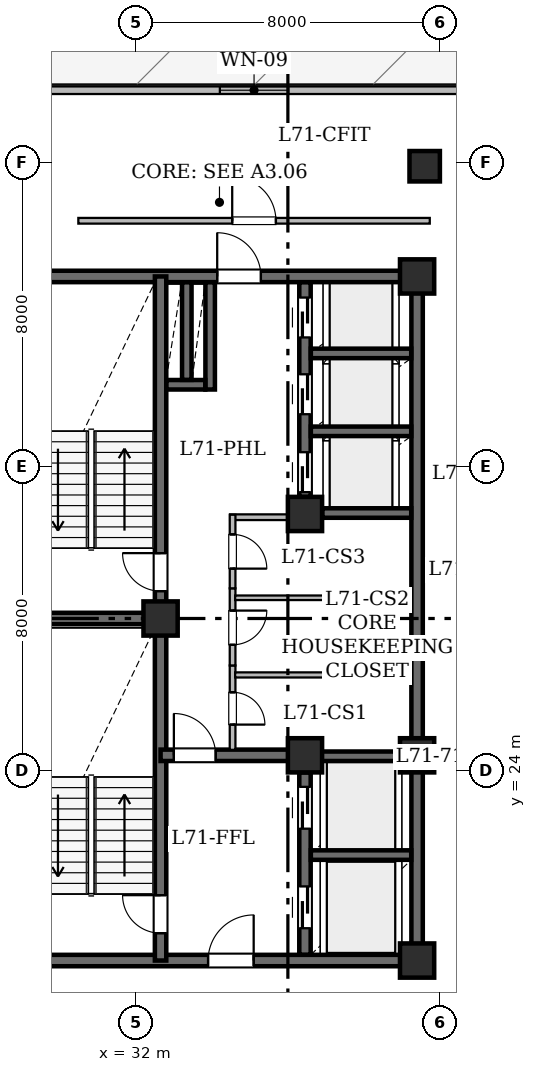
"""IFC4 building model, lengths in metres.
Left out: names, types, materials, properties, quantities, classifications, styles, units other than length and angle.
Written with IfcOpenShell. Run it as: python <this file> out.ifc"""

import sys

from ifc_helpers import new_model, si_unit, direction, frame, frame_2d, origin, origin_2d, place, context, subcontext, project, spatial, rectangle, hollow_rectangle, extrude, element, fill, save


model = new_model("IFC4")
c1 = context("Model", 3, precision=1e-05, world=origin(), true_north=direction((0.0, 1.0)))
c2 = subcontext(c1, "Body", "Model", "MODEL_VIEW")
j1 = project(units=[si_unit("LENGTHUNIT", "METRE"), si_unit("PLANEANGLEUNIT", "RADIAN")], contexts=[c1])
p1 = place(None, origin())
s1 = spatial("IfcSite", under=j1, at=p1, CompositionType="ELEMENT")
p2 = place(p1, origin())
s2 = spatial("IfcBuilding", under=s1, at=p2, CompositionType="ELEMENT")
p3 = place(p2, frame((0.0, 0.0, 277.85)))
s3 = spatial("IfcBuildingStorey", under=s2, at=p3, CompositionType="ELEMENT", Elevation=277.85)
for number, where, z_axis, x_axis in (
    (1, (32.65, 28.0, 0.0), (0.0, 0.0, 1.0), (1.0, 0.0, 0.0)),
    (2, (39.4, 19.0, 0.0), (0.0, 0.0, 1.0), (1.0, 0.0, 0.0)),
    (3, (36.45, 24.4, 0.0), (0.0, 0.0, 1.0), (1.0, 0.0, 0.0)),
    (4, (39.4, 24.4, 0.0), (0.0, 0.0, 1.0), (1.0, 0.0, 0.0)),
    (5, (36.45, 30.75, 0.0), (0.0, 0.0, 1.0), (1.0, 0.0, 0.0)),
    (6, (39.4, 37.0, 0.0), (0.0, 0.0, 1.0), (1.0, 0.0, 0.0)),
):
    element("IfcColumn", number, at=place(p3, frame(where, z_axis=z_axis, x_axis=x_axis)), inside=s3, PredefinedType="COLUMN", context=c2, shape_type="SweptSolid", body=[
        extrude(hollow_rectangle(XDim=0.9, YDim=0.9, WallThickness=0.045, at=origin_2d()), origin(), (0.0, 0.0, 1.0), 4.2),
    ])
p4 = place(p3, frame((39.6, 39.9, 0.025), z_axis=(0.0, 0.0, 1.0), x_axis=(1.0, 0.0, 0.0)))
e7 = element("IfcColumn", 7, at=p4, inside=s3, PredefinedType="COLUMN", context=c2, shape_type="SweptSolid", body=[
    extrude(hollow_rectangle(XDim=0.8, YDim=0.8, WallThickness=0.04, at=origin_2d()), origin(), (0.0, 0.0, 1.0), 4.175),
])
p5 = place(p3, frame((27.102, 41.9, 0.0), z_axis=(0.0, 0.0, 1.0), x_axis=(1.0, 0.0, 0.0)))
e8 = element("IfcWall", 8, at=p5, inside=s3, PredefinedType="STANDARD", context=c2, shape_type="SweptSolid", body=[
    extrude(rectangle(XDim=35.857, YDim=0.2, at=frame_2d((17.928, 0.0))), origin(), (0.0, 0.0, 1.0), 3.95),
])
p6 = place(p5, frame((20.417, 0.0, 0.0)))
e9 = element("IfcOpeningElement", 9, at=p6, cuts=e8, PredefinedType="OPENING", context=c2, shape_type="SweptSolid", body=[
    extrude(rectangle(XDim=1.0, YDim=2.15, at=frame_2d((0.5, 1.075))), frame((0.0, 0.11, 0.0), z_axis=(0.0, -1.0, 0.0), x_axis=(1.0, 0.0, 0.0)), (0.0, 0.0, 1.0), 0.22),
])
p7 = place(p5, frame((7.108, 0.0, 0.85)))
e10 = element("IfcOpeningElement", 10, at=p7, cuts=e8, PredefinedType="OPENING", context=c2, shape_type="SweptSolid", body=[
    extrude(rectangle(XDim=1.8, YDim=0.92, at=frame_2d((0.9, 0.46))), frame((0.0, 0.11, 0.0), z_axis=(0.0, -1.0, 0.0), x_axis=(1.0, 0.0, 0.0)), (0.0, 0.0, 1.0), 0.22),
])
p8 = place(p5, frame((17.233, 0.0, 0.78)))
e11 = element("IfcOpeningElement", 11, at=p8, cuts=e8, PredefinedType="OPENING", context=c2, shape_type="SweptSolid", body=[
    extrude(rectangle(XDim=1.2, YDim=1.5, at=frame_2d((0.6, 0.75))), frame((0.0, 0.11, 0.0), z_axis=(0.0, -1.0, 0.0), x_axis=(1.0, 0.0, 0.0)), (0.0, 0.0, 1.0), 0.22),
])
p9 = place(p5, frame((26.073, 0.0, 0.85)))
e12 = element("IfcOpeningElement", 12, at=p9, cuts=e8, PredefinedType="OPENING", context=c2, shape_type="SweptSolid", body=[
    extrude(rectangle(XDim=1.8, YDim=0.92, at=frame_2d((0.9, 0.46))), frame((0.0, 0.11, 0.0), z_axis=(0.0, -1.0, 0.0), x_axis=(1.0, 0.0, 0.0)), (0.0, 0.0, 1.0), 0.22),
])
p10 = place(p3, frame((29.0, 19.0, 0.0), z_axis=(0.0, 0.0, 1.0), x_axis=(1.0, 0.0, 0.0)))
e13 = element("IfcWall", 13, at=p10, inside=s3, PredefinedType="SHEAR", context=c2, shape_type="SweptSolid", body=[
    extrude(rectangle(XDim=10.4, YDim=0.3, at=frame_2d((5.2, 0.0))), origin(), (0.0, 0.0, 1.0), 3.95),
])
p11 = place(p10, frame((4.9, 0.0, 0.0)))
e14 = element("IfcOpeningElement", 14, at=p11, cuts=e13, PredefinedType="OPENING", context=c2, shape_type="SweptSolid", body=[
    extrude(rectangle(XDim=1.2, YDim=2.15, at=frame_2d((0.6, 1.075))), frame((0.0, 0.16, 0.0), z_axis=(0.0, -1.0, 0.0), x_axis=(1.0, 0.0, 0.0)), (0.0, 0.0, 1.0), 0.32),
])
p12 = place(p3, frame((29.0, 37.0, 0.0), z_axis=(0.0, 0.0, 1.0), x_axis=(1.0, 0.0, 0.0)))
e15 = element("IfcWall", 15, at=p12, inside=s3, PredefinedType="SHEAR", context=c2, shape_type="SweptSolid", body=[
    extrude(rectangle(XDim=10.4, YDim=0.3, at=frame_2d((5.2, 0.0))), origin(), (0.0, 0.0, 1.0), 3.95),
])
p13 = place(p12, frame((5.14, 0.0, 0.0)))
e16 = element("IfcOpeningElement", 16, at=p13, cuts=e15, PredefinedType="OPENING", context=c2, shape_type="SweptSolid", body=[
    extrude(rectangle(XDim=1.15, YDim=2.2, at=frame_2d((0.575, 1.1))), frame((0.0, 0.16, 0.0), z_axis=(0.0, -1.0, 0.0), x_axis=(1.0, 0.0, 0.0)), (0.0, 0.0, 1.0), 0.32),
])
p14 = place(p3, frame((39.4, 19.0, 0.0), z_axis=(0.0, 0.0, 1.0), x_axis=(0.0, 1.0, 0.0)))
e17 = element("IfcWall", 17, at=p14, inside=s3, PredefinedType="SHEAR", context=c2, shape_type="SweptSolid", body=[
    extrude(rectangle(XDim=5.4, YDim=0.3, at=frame_2d((2.7, 0.0))), origin(), (0.0, 0.0, 1.0), 3.95),
])
p15 = place(p3, frame((39.4, 24.4, 0.0), z_axis=(0.0, 0.0, 1.0), x_axis=(0.0, 1.0, 0.0)))
e18 = element("IfcWall", 18, at=p15, inside=s3, PredefinedType="SHEAR", context=c2, shape_type="SweptSolid", body=[
    extrude(rectangle(XDim=12.6, YDim=0.3, at=frame_2d((6.3, 0.0))), origin(), (0.0, 0.0, 1.0), 3.95),
])
p16 = place(p3, frame((32.65, 19.0, 0.0), z_axis=(0.0, 0.0, 1.0), x_axis=(0.0, 1.0, 0.0)))
e19 = element("IfcWall", 19, at=p16, inside=s3, PredefinedType="SHEAR", context=c2, shape_type="SweptSolid", body=[
    extrude(rectangle(XDim=9.0, YDim=0.3, at=frame_2d((4.5, 0.0))), origin(), (0.0, 0.0, 1.0), 3.95),
])
p17 = place(p16, frame((0.72, 0.0, 0.0)))
e20 = element("IfcOpeningElement", 20, at=p17, cuts=e19, PredefinedType="OPENING", context=c2, shape_type="SweptSolid", body=[
    extrude(rectangle(XDim=1.0, YDim=2.15, at=frame_2d((0.5, 1.075))), frame((0.0, 0.16, 0.0), z_axis=(0.0, -1.0, 0.0), x_axis=(1.0, 0.0, 0.0)), (0.0, 0.0, 1.0), 0.32),
])
p18 = place(p3, frame((32.65, 28.0, 0.0), z_axis=(0.0, 0.0, 1.0), x_axis=(0.0, 1.0, 0.0)))
e21 = element("IfcWall", 21, at=p18, inside=s3, PredefinedType="SHEAR", context=c2, shape_type="SweptSolid", body=[
    extrude(rectangle(XDim=9.0, YDim=0.3, at=frame_2d((4.5, 0.0))), origin(), (0.0, 0.0, 1.0), 3.95),
])
p19 = place(p18, frame((0.72, 0.0, 0.0)))
e22 = element("IfcOpeningElement", 22, at=p19, cuts=e21, PredefinedType="OPENING", context=c2, shape_type="SweptSolid", body=[
    extrude(rectangle(XDim=1.0, YDim=2.15, at=frame_2d((0.5, 1.075))), frame((0.0, 0.16, 0.0), z_axis=(0.0, -1.0, 0.0), x_axis=(1.0, 0.0, 0.0)), (0.0, 0.0, 1.0), 0.32),
])
p20 = place(p3, frame((29.0, 28.0, 0.0), z_axis=(0.0, 0.0, 1.0), x_axis=(1.0, 0.0, 0.0)))
e23 = element("IfcWall", 23, at=p20, inside=s3, PredefinedType="SHEAR", context=c2, shape_type="SweptSolid", body=[
    extrude(rectangle(XDim=3.65, YDim=0.3, at=frame_2d((1.825, 0.0))), origin(), (0.0, 0.0, 1.0), 3.95),
])
p21 = place(p3, frame((32.65, 24.4, 0.0), z_axis=(0.0, 0.0, 1.0), x_axis=(1.0, 0.0, 0.0)))
e24 = element("IfcWall", 24, at=p21, inside=s3, PredefinedType="SHEAR", context=c2, shape_type="SweptSolid", body=[
    extrude(rectangle(XDim=3.8, YDim=0.3, at=frame_2d((1.9, 0.0))), origin(), (0.0, 0.0, 1.0), 3.95),
])
p22 = place(p21, frame((0.35, 0.0, 0.0)))
e25 = element("IfcOpeningElement", 25, at=p22, cuts=e24, PredefinedType="OPENING", context=c2, shape_type="SweptSolid", body=[
    extrude(rectangle(XDim=1.1, YDim=2.15, at=frame_2d((0.55, 1.075))), frame((0.0, 0.16, 0.0), z_axis=(0.0, -1.0, 0.0), x_axis=(1.0, 0.0, 0.0)), (0.0, 0.0, 1.0), 0.32),
])
p23 = place(p3, frame((36.45, 19.154, 0.0), z_axis=(0.0, 0.0, 1.0), x_axis=(0.0, 1.0, 0.0)))
e26 = element("IfcWall", 26, at=p23, inside=s3, PredefinedType="SHEAR", context=c2, shape_type="SweptSolid", body=[
    extrude(rectangle(XDim=4.796, YDim=0.3, at=frame_2d((2.398, 0.0))), origin(), (0.0, 0.0, 1.0), 3.95),
])
p24 = place(p23, frame((0.696, 0.0, 0.0)))
e27 = element("IfcOpeningElement", 27, at=p24, cuts=e26, PredefinedType="OPENING", context=c2, shape_type="SweptSolid", body=[
    extrude(rectangle(XDim=1.1, YDim=2.15, at=frame_2d((0.55, 1.075))), frame((0.0, 0.16, 0.0), z_axis=(0.0, -1.0, 0.0), x_axis=(1.0, 0.0, 0.0)), (0.0, 0.0, 1.0), 0.32),
])
p25 = place(p23, frame((3.316, 0.0, 0.0)))
e28 = element("IfcOpeningElement", 28, at=p25, cuts=e26, PredefinedType="OPENING", context=c2, shape_type="SweptSolid", body=[
    extrude(rectangle(XDim=1.1, YDim=2.15, at=frame_2d((0.55, 1.075))), frame((0.0, 0.16, 0.0), z_axis=(0.0, -1.0, 0.0), x_axis=(1.0, 0.0, 0.0)), (0.0, 0.0, 1.0), 0.32),
])
p26 = place(p3, frame((36.45, 31.2, 0.0), z_axis=(0.0, 0.0, 1.0), x_axis=(0.0, 1.0, 0.0)))
e29 = element("IfcWall", 29, at=p26, inside=s3, PredefinedType="SHEAR", context=c2, shape_type="SweptSolid", body=[
    extrude(rectangle(XDim=5.646, YDim=0.3, at=frame_2d((2.823, 0.0))), origin(), (0.0, 0.0, 1.0), 3.95),
])
p27 = place(p26, frame((0.125, 0.0, 0.0)))
e30 = element("IfcOpeningElement", 30, at=p27, cuts=e29, PredefinedType="OPENING", context=c2, shape_type="SweptSolid", body=[
    extrude(rectangle(XDim=1.05, YDim=2.15, at=frame_2d((0.525, 1.075))), frame((0.0, 0.16, 0.0), z_axis=(0.0, -1.0, 0.0), x_axis=(1.0, 0.0, 0.0)), (0.0, 0.0, 1.0), 0.32),
])
p28 = place(p26, frame((2.175, 0.0, 0.0)))
e31 = element("IfcOpeningElement", 31, at=p28, cuts=e29, PredefinedType="OPENING", context=c2, shape_type="SweptSolid", body=[
    extrude(rectangle(XDim=1.05, YDim=2.15, at=frame_2d((0.525, 1.075))), frame((0.0, 0.16, 0.0), z_axis=(0.0, -1.0, 0.0), x_axis=(1.0, 0.0, 0.0)), (0.0, 0.0, 1.0), 0.32),
])
p29 = place(p26, frame((4.195, 0.0, 0.0)))
e32 = element("IfcOpeningElement", 32, at=p29, cuts=e29, PredefinedType="OPENING", context=c2, shape_type="SweptSolid", body=[
    extrude(rectangle(XDim=1.05, YDim=2.15, at=frame_2d((0.525, 1.075))), frame((0.0, 0.16, 0.0), z_axis=(0.0, -1.0, 0.0), x_axis=(1.0, 0.0, 0.0)), (0.0, 0.0, 1.0), 0.32),
])
for number, where, z_axis, x_axis in (
    (33, (36.604, 21.775, 0.0), (0.0, 0.0, 1.0), (1.0, 0.0, 0.0)),
    (34, (36.604, 24.375, 0.0), (0.0, 0.0, 1.0), (1.0, 0.0, 0.0)),
):
    element("IfcWall", number, at=place(p3, frame(where, z_axis=z_axis, x_axis=x_axis)), inside=s3, PredefinedType="SHEAR", context=c2, shape_type="SweptSolid", body=[
        extrude(rectangle(XDim=2.642, YDim=0.25, at=frame_2d((1.321, 0.0))), origin(), (0.0, 0.0, 1.0), 3.95),
    ])
p30 = place(p3, frame((36.904, 30.775, 0.0), z_axis=(0.0, 0.0, 1.0), x_axis=(1.0, 0.0, 0.0)))
e35 = element("IfcWall", 35, at=p30, inside=s3, PredefinedType="SHEAR", context=c2, shape_type="SweptSolid", body=[
    extrude(rectangle(XDim=2.342, YDim=0.25, at=frame_2d((1.171, 0.0))), origin(), (0.0, 0.0, 1.0), 3.95),
])
for number, where, z_axis, x_axis in (
    (36, (36.604, 32.925, 0.0), (0.0, 0.0, 1.0), (1.0, 0.0, 0.0)),
    (37, (36.604, 34.975, 0.0), (0.0, 0.0, 1.0), (1.0, 0.0, 0.0)),
):
    element("IfcWall", number, at=place(p3, frame(where, z_axis=z_axis, x_axis=x_axis)), inside=s3, PredefinedType="SHEAR", context=c2, shape_type="SweptSolid", body=[
        extrude(rectangle(XDim=2.642, YDim=0.25, at=frame_2d((1.321, 0.0))), origin(), (0.0, 0.0, 1.0), 3.95),
    ])
p31 = place(p3, frame((33.955, 34.025, 0.0), z_axis=(0.0, 0.0, 1.0), x_axis=(0.0, 1.0, 0.0)))
e38 = element("IfcWall", 38, at=p31, inside=s3, PredefinedType="SHEAR", context=c2, shape_type="SweptSolid", body=[
    extrude(rectangle(XDim=2.821, YDim=0.25, at=frame_2d((1.411, 0.0))), origin(), (0.0, 0.0, 1.0), 3.95),
])
p32 = place(p3, frame((32.804, 34.15, 0.0), z_axis=(0.0, 0.0, 1.0), x_axis=(1.0, 0.0, 0.0)))
e39 = element("IfcWall", 39, at=p32, inside=s3, PredefinedType="SHEAR", context=c2, shape_type="SweptSolid", body=[
    extrude(rectangle(XDim=1.022, YDim=0.25, at=frame_2d((0.511, 0.0))), origin(), (0.0, 0.0, 1.0), 3.95),
])
p33 = place(p3, frame((33.34, 34.279, 0.0), z_axis=(0.0, 0.0, 1.0), x_axis=(0.0, 1.0, 0.0)))
e40 = element("IfcWall", 40, at=p33, inside=s3, PredefinedType="SHEAR", context=c2, shape_type="SweptSolid", body=[
    extrude(rectangle(XDim=2.567, YDim=0.25, at=frame_2d((1.283, 0.0))), origin(), (0.0, 0.0, 1.0), 3.95),
])
p34 = place(p3, frame((34.545, 26.764, 0.0), z_axis=(0.0, 0.0, 1.0), x_axis=(0.0, -1.0, 0.0)))
e41 = element("IfcWall", 41, at=p34, inside=s3, PredefinedType="STANDARD", context=c2, shape_type="SweptSolid", body=[
    extrude(rectangle(XDim=2.22, YDim=0.15, at=frame_2d((1.11, 0.0))), origin(), (0.0, 0.0, 1.0), 3.95),
])
p35 = place(p34, frame((0.706, 0.0, 0.0)))
e42 = element("IfcOpeningElement", 42, at=p35, cuts=e41, PredefinedType="OPENING", context=c2, shape_type="SweptSolid", body=[
    extrude(rectangle(XDim=0.85, YDim=2.1, at=frame_2d((0.425, 1.05))), frame((0.0, 0.085, 0.0), z_axis=(0.0, -1.0, 0.0), x_axis=(1.0, 0.0, 0.0)), (0.0, 0.0, 1.0), 0.17),
])
p36 = place(p3, frame((34.545, 28.794, 0.0), z_axis=(0.0, 0.0, 1.0), x_axis=(0.0, -1.0, 0.0)))
e43 = element("IfcWall", 43, at=p36, inside=s3, PredefinedType="STANDARD", context=c2, shape_type="SweptSolid", body=[
    extrude(rectangle(XDim=2.03, YDim=0.15, at=frame_2d((1.015, 0.0))), origin(), (0.0, 0.0, 1.0), 3.95),
])
p37 = place(p36, frame((0.586, 0.0, 0.0)))
e44 = element("IfcOpeningElement", 44, at=p37, cuts=e43, PredefinedType="OPENING", context=c2, shape_type="SweptSolid", body=[
    extrude(rectangle(XDim=0.9, YDim=2.1, at=frame_2d((0.45, 1.05))), frame((0.0, 0.085, 0.0), z_axis=(0.0, -1.0, 0.0), x_axis=(1.0, 0.0, 0.0)), (0.0, 0.0, 1.0), 0.17),
])
p38 = place(p3, frame((36.3, 30.665, 0.0), z_axis=(0.0, 0.0, 1.0), x_axis=(-1.0, 0.0, 0.0)))
e45 = element("IfcWall", 45, at=p38, inside=s3, PredefinedType="STANDARD", context=c2, shape_type="SweptSolid", body=[
    extrude(rectangle(XDim=1.82, YDim=0.15, at=frame_2d((0.91, 0.0))), origin(), (0.0, 0.0, 1.0), 3.95),
])
p39 = place(p3, frame((34.545, 30.73, 0.0), z_axis=(0.0, 0.0, 1.0), x_axis=(0.0, -1.0, 0.0)))
e46 = element("IfcWall", 46, at=p39, inside=s3, PredefinedType="STANDARD", context=c2, shape_type="SweptSolid", body=[
    extrude(rectangle(XDim=1.936, YDim=0.15, at=frame_2d((0.968, 0.0))), origin(), (0.0, 0.0, 1.0), 3.95),
])
p40 = place(p39, frame((0.518, 0.0, 0.0)))
e47 = element("IfcOpeningElement", 47, at=p40, cuts=e46, PredefinedType="OPENING", context=c2, shape_type="SweptSolid", body=[
    extrude(rectangle(XDim=0.9, YDim=2.1, at=frame_2d((0.45, 1.05))), frame((0.0, 0.085, 0.0), z_axis=(0.0, -1.0, 0.0), x_axis=(1.0, 0.0, 0.0)), (0.0, 0.0, 1.0), 0.17),
])
p41 = place(p3, frame((34.612, 26.515, 0.0), z_axis=(0.0, 0.0, 1.0), x_axis=(1.0, 0.0, 0.0)))
e48 = element("IfcWall", 48, at=p41, inside=s3, PredefinedType="PARTITIONING", context=c2, shape_type="SweptSolid", body=[
    extrude(rectangle(XDim=4.644, YDim=0.135, at=frame_2d((2.322, 0.0))), origin(), (0.0, 0.0, 1.0), 3.95),
])
p42 = place(p3, frame((34.612, 28.545, 0.0), z_axis=(0.0, 0.0, 1.0), x_axis=(1.0, 0.0, 0.0)))
e49 = element("IfcWall", 49, at=p42, inside=s3, PredefinedType="PARTITIONING", context=c2, shape_type="SweptSolid", body=[
    extrude(rectangle(XDim=4.644, YDim=0.12, at=frame_2d((2.322, 0.0))), origin(), (0.0, 0.0, 1.0), 3.95),
])
p43 = place(p3, frame((30.486, 38.465, 0.0), z_axis=(0.0, 0.0, 1.0), x_axis=(1.0, 0.0, 0.0)))
e50 = element("IfcWall", 50, at=p43, inside=s3, PredefinedType="STANDARD", context=c2, shape_type="SweptSolid", body=[
    extrude(rectangle(XDim=9.248, YDim=0.15, at=frame_2d((4.624, 0.0))), origin(), (0.0, 0.0, 1.0), 3.245),
])
p44 = place(p43, frame((4.049, 0.0, 0.0)))
e51 = element("IfcOpeningElement", 51, at=p44, cuts=e50, PredefinedType="OPENING", context=c2, shape_type="SweptSolid", body=[
    extrude(rectangle(XDim=1.15, YDim=2.2, at=frame_2d((0.575, 1.1))), frame((0.0, 0.085, 0.0), z_axis=(0.0, -1.0, 0.0), x_axis=(1.0, 0.0, 0.0)), (0.0, 0.0, 1.0), 0.17),
])
p45 = place(p7, origin())
e52 = element("IfcWindow", 52, at=p45, inside=s3, PartitioningType="SINGLE_PANEL", PredefinedType="WINDOW", context=c2, shape_type="SweptSolid", body=[
    extrude(rectangle(XDim=1.8, YDim=0.92, at=frame_2d((0.9, 0.46))), frame((0.0, 0.03, 0.0), z_axis=(0.0, -1.0, 0.0), x_axis=(1.0, 0.0, 0.0)), (0.0, 0.0, 1.0), 0.06),
])
fill(e10, e52)
p46 = place(p17, origin())
e53 = element("IfcDoor", 53, at=p46, inside=s3, OperationType="SINGLE_SWING_RIGHT", PredefinedType="DOOR", context=c2, shape_type="SweptSolid", body=[
    extrude(rectangle(XDim=1.0, YDim=2.15, at=frame_2d((0.5, 1.075))), frame((0.0, 0.025, 0.0), z_axis=(0.0, -1.0, 0.0), x_axis=(1.0, 0.0, 0.0)), (0.0, 0.0, 1.0), 0.05),
])
fill(e20, e53)
p47 = place(p19, origin())
e54 = element("IfcDoor", 54, at=p47, inside=s3, OperationType="SINGLE_SWING_RIGHT", PredefinedType="DOOR", context=c2, shape_type="SweptSolid", body=[
    extrude(rectangle(XDim=1.0, YDim=2.15, at=frame_2d((0.5, 1.075))), frame((0.0, 0.025, 0.0), z_axis=(0.0, -1.0, 0.0), x_axis=(1.0, 0.0, 0.0)), (0.0, 0.0, 1.0), 0.05),
])
fill(e22, e54)
p48 = place(p22, origin())
e55 = element("IfcDoor", 55, at=p48, inside=s3, OperationType="SINGLE_SWING_LEFT", PredefinedType="DOOR", context=c2, shape_type="SweptSolid", body=[
    extrude(rectangle(XDim=1.1, YDim=2.15, at=frame_2d((0.55, 1.075))), frame((0.0, 0.025, 0.0), z_axis=(0.0, -1.0, 0.0), x_axis=(1.0, 0.0, 0.0)), (0.0, 0.0, 1.0), 0.05),
])
fill(e25, e55)
p49 = place(p11, origin())
e56 = element("IfcDoor", 56, at=p49, inside=s3, OperationType="SINGLE_SWING_RIGHT", PredefinedType="DOOR", context=c2, shape_type="SweptSolid", body=[
    extrude(rectangle(XDim=1.2, YDim=2.15, at=frame_2d((0.6, 1.075))), frame((0.0, 0.025, 0.0), z_axis=(0.0, -1.0, 0.0), x_axis=(1.0, 0.0, 0.0)), (0.0, 0.0, 1.0), 0.05),
])
fill(e14, e56)
p50 = place(p13, origin())
e57 = element("IfcDoor", 57, at=p50, inside=s3, OperationType="SINGLE_SWING_LEFT", PredefinedType="DOOR", context=c2, shape_type="SweptSolid", body=[
    extrude(rectangle(XDim=1.15, YDim=2.2, at=frame_2d((0.575, 1.1))), frame((0.0, 0.025, 0.0), z_axis=(0.0, -1.0, 0.0), x_axis=(1.0, 0.0, 0.0)), (0.0, 0.0, 1.0), 0.05),
])
fill(e16, e57)
p51 = place(p24, origin())
e58 = element("IfcDoor", 58, at=p51, inside=s3, OperationType="SLIDING_TO_LEFT", PredefinedType="DOOR", context=c2, shape_type="SweptSolid", body=[
    extrude(rectangle(XDim=1.1, YDim=2.15, at=frame_2d((0.55, 1.075))), frame((0.0, 0.025, 0.0), z_axis=(0.0, -1.0, 0.0), x_axis=(1.0, 0.0, 0.0)), (0.0, 0.0, 1.0), 0.05),
])
fill(e27, e58)
p52 = place(p25, origin())
e59 = element("IfcDoor", 59, at=p52, inside=s3, OperationType="SLIDING_TO_LEFT", PredefinedType="DOOR", context=c2, shape_type="SweptSolid", body=[
    extrude(rectangle(XDim=1.1, YDim=2.15, at=frame_2d((0.55, 1.075))), frame((0.0, 0.025, 0.0), z_axis=(0.0, -1.0, 0.0), x_axis=(1.0, 0.0, 0.0)), (0.0, 0.0, 1.0), 0.05),
])
fill(e28, e59)
p53 = place(p27, origin())
e60 = element("IfcDoor", 60, at=p53, inside=s3, OperationType="SLIDING_TO_LEFT", PredefinedType="DOOR", context=c2, shape_type="SweptSolid", body=[
    extrude(rectangle(XDim=1.05, YDim=2.15, at=frame_2d((0.525, 1.075))), frame((0.0, 0.025, 0.0), z_axis=(0.0, -1.0, 0.0), x_axis=(1.0, 0.0, 0.0)), (0.0, 0.0, 1.0), 0.05),
])
fill(e30, e60)
p54 = place(p28, origin())
e61 = element("IfcDoor", 61, at=p54, inside=s3, OperationType="SLIDING_TO_LEFT", PredefinedType="DOOR", context=c2, shape_type="SweptSolid", body=[
    extrude(rectangle(XDim=1.05, YDim=2.15, at=frame_2d((0.525, 1.075))), frame((0.0, 0.025, 0.0), z_axis=(0.0, -1.0, 0.0), x_axis=(1.0, 0.0, 0.0)), (0.0, 0.0, 1.0), 0.05),
])
fill(e31, e61)
p55 = place(p29, origin())
e62 = element("IfcDoor", 62, at=p55, inside=s3, OperationType="SLIDING_TO_LEFT", PredefinedType="DOOR", context=c2, shape_type="SweptSolid", body=[
    extrude(rectangle(XDim=1.05, YDim=2.15, at=frame_2d((0.525, 1.075))), frame((0.0, 0.025, 0.0), z_axis=(0.0, -1.0, 0.0), x_axis=(1.0, 0.0, 0.0)), (0.0, 0.0, 1.0), 0.05),
])
fill(e32, e62)
p56 = place(p35, origin())
e63 = element("IfcDoor", 63, at=p56, inside=s3, OperationType="SINGLE_SWING_RIGHT", PredefinedType="DOOR", context=c2, shape_type="SweptSolid", body=[
    extrude(rectangle(XDim=0.85, YDim=2.1, at=frame_2d((0.425, 1.05))), frame((0.0, 0.025, 0.0), z_axis=(0.0, -1.0, 0.0), x_axis=(1.0, 0.0, 0.0)), (0.0, 0.0, 1.0), 0.05),
])
fill(e42, e63)
p57 = place(p37, origin())
e64 = element("IfcDoor", 64, at=p57, inside=s3, OperationType="SINGLE_SWING_LEFT", PredefinedType="DOOR", context=c2, shape_type="SweptSolid", body=[
    extrude(rectangle(XDim=0.9, YDim=2.1, at=frame_2d((0.45, 1.05))), frame((0.0, 0.025, 0.0), z_axis=(0.0, -1.0, 0.0), x_axis=(1.0, 0.0, 0.0)), (0.0, 0.0, 1.0), 0.05),
])
fill(e44, e64)
p58 = place(p40, origin())
e65 = element("IfcDoor", 65, at=p58, inside=s3, OperationType="SINGLE_SWING_RIGHT", PredefinedType="DOOR", context=c2, shape_type="SweptSolid", body=[
    extrude(rectangle(XDim=0.9, YDim=2.1, at=frame_2d((0.45, 1.05))), frame((0.0, 0.025, 0.0), z_axis=(0.0, -1.0, 0.0), x_axis=(1.0, 0.0, 0.0)), (0.0, 0.0, 1.0), 0.05),
])
fill(e47, e65)
p59 = place(p44, origin())
e66 = element("IfcDoor", 66, at=p59, inside=s3, OperationType="SINGLE_SWING_LEFT", PredefinedType="DOOR", context=c2, shape_type="SweptSolid", body=[
    extrude(rectangle(XDim=1.15, YDim=2.2, at=frame_2d((0.575, 1.1))), frame((0.0, 0.025, 0.0), z_axis=(0.0, -1.0, 0.0), x_axis=(1.0, 0.0, 0.0)), (0.0, 0.0, 1.0), 0.05),
])
fill(e51, e66)
save(model, sys.argv[1])
